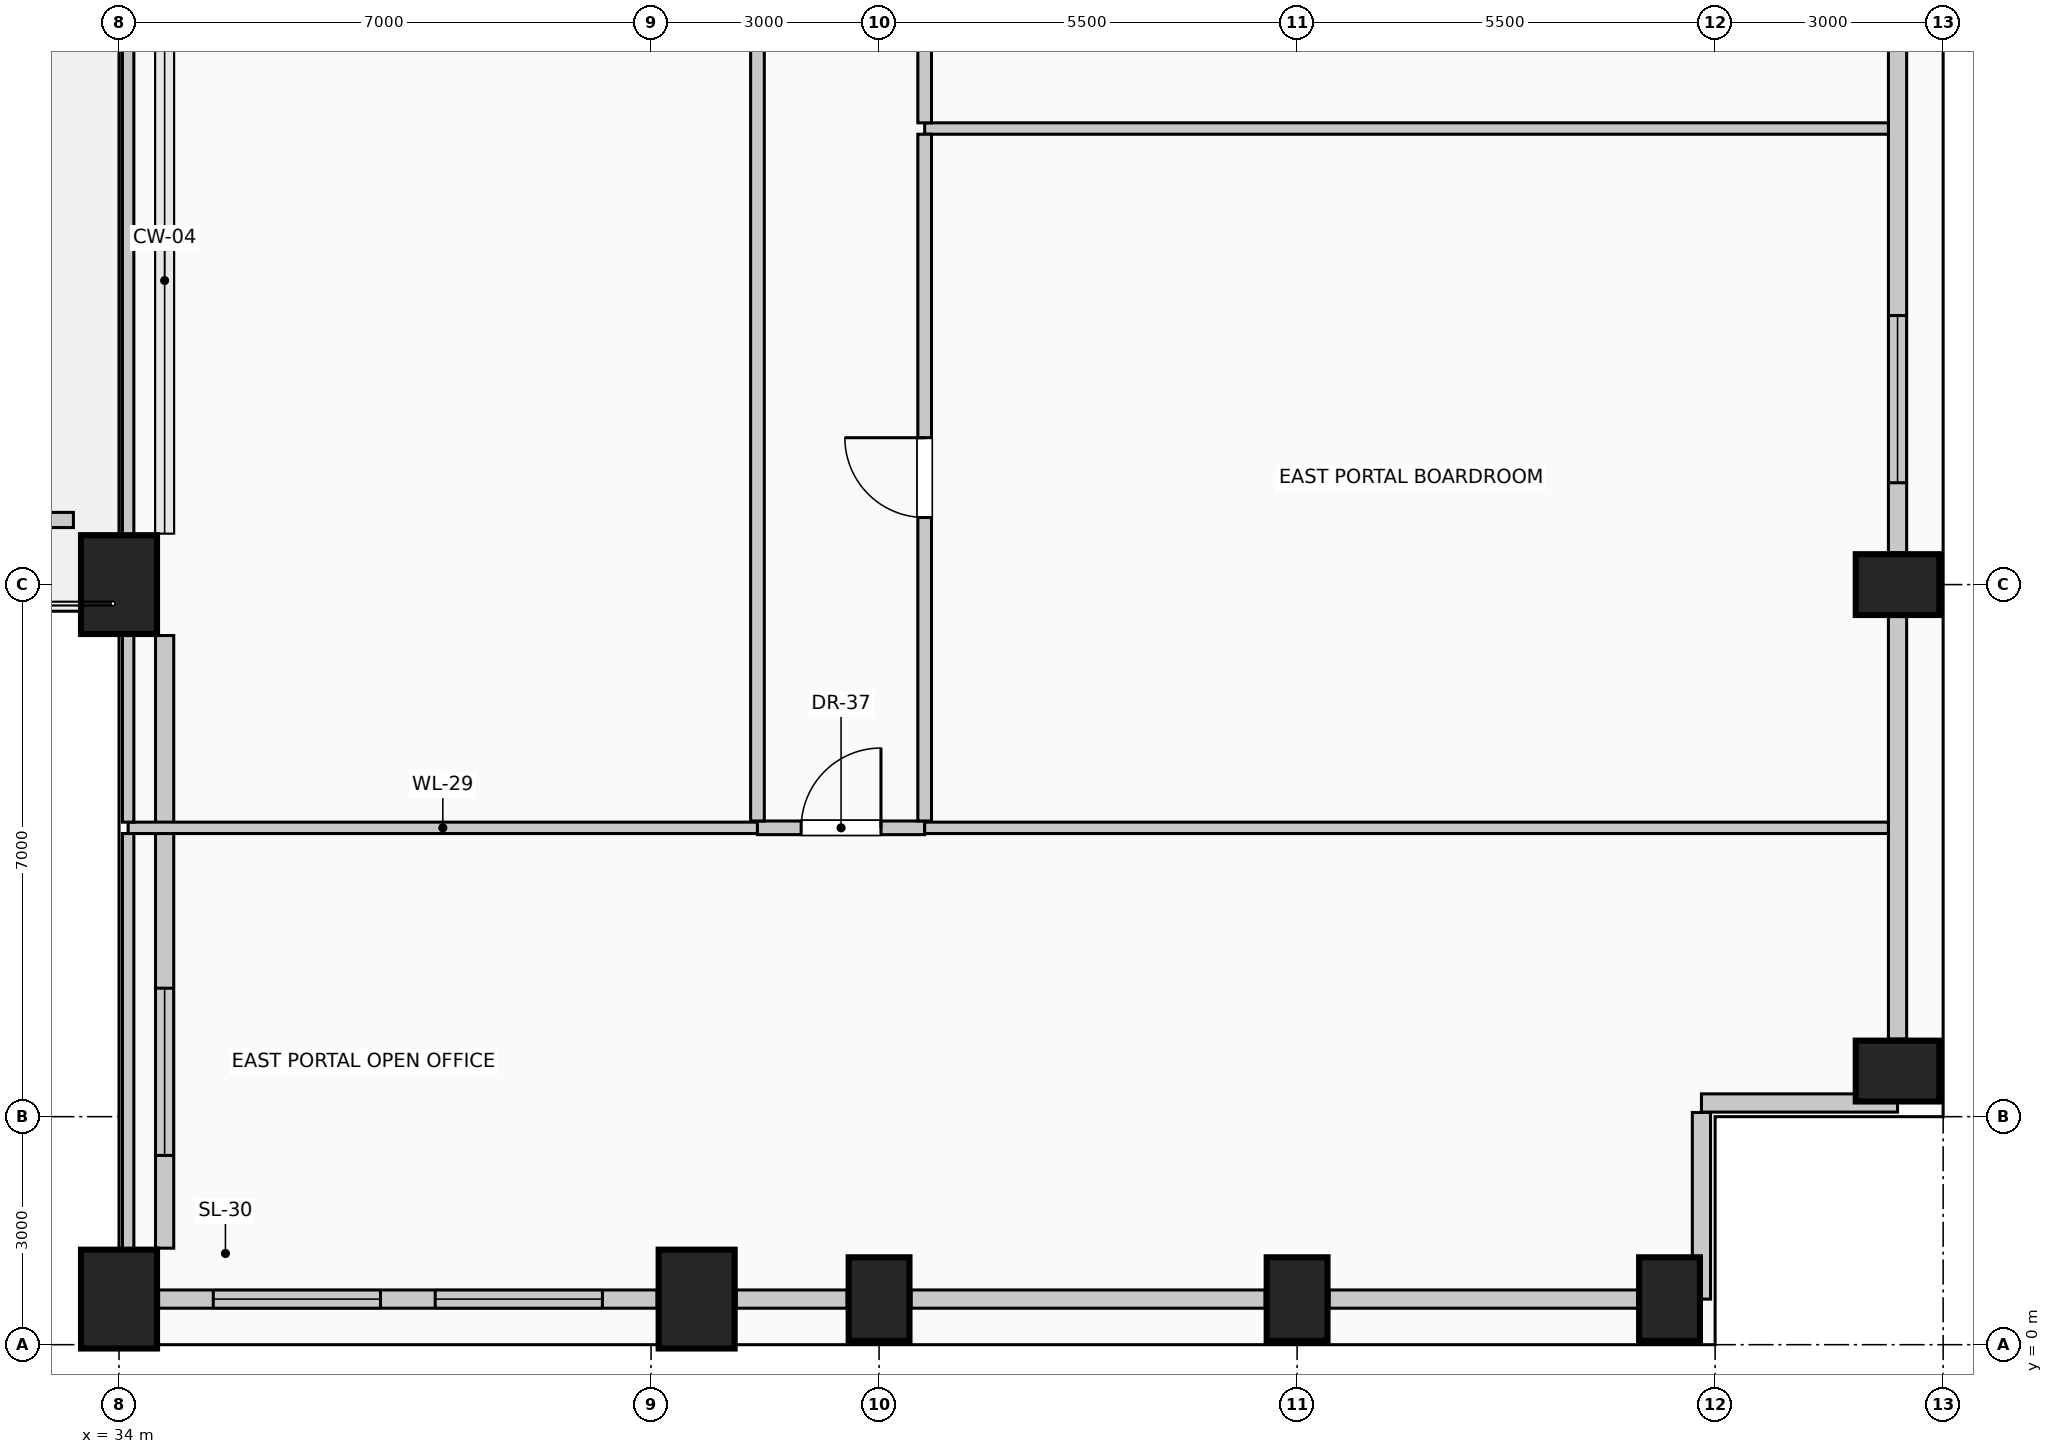
"""IFC4 building model, lengths in metres.
Left out: names, types, materials, properties, quantities, classifications, styles, units other than length and angle.
Written with IfcOpenShell. Run it as: python <this file> out.ifc"""

import sys

from ifc_helpers import new_model, si_unit, direction, frame, frame_2d, origin, origin_2d, place, context, subcontext, project, spatial, rectangle, extrude, element, fill, save


model = new_model("IFC4")
c1 = context("Model", 3, precision=1e-05, world=origin(), true_north=direction((0.0, 1.0)))
c2 = subcontext(c1, "Body", "Model", "MODEL_VIEW")
j1 = project(units=[si_unit("LENGTHUNIT", "METRE"), si_unit("PLANEANGLEUNIT", "RADIAN")], contexts=[c1])
p1 = place(None, origin())
s1 = spatial("IfcSite", under=j1, at=p1, CompositionType="ELEMENT")
p2 = place(p1, origin())
s2 = spatial("IfcBuilding", under=s1, at=p2, CompositionType="ELEMENT")
p3 = place(p2, frame((0.0, 0.0, 182.6)))
s3 = spatial("IfcBuildingStorey", under=s2, at=p3, CompositionType="ELEMENT", Elevation=182.6)
for number, where, z_axis, x_axis in (
    (1, (34.0, 0.6, 0.0), (0.0, 0.0, 1.0), (1.0, 0.0, 0.0)),
    (2, (41.6, 0.6, 0.0), (0.0, 0.0, 1.0), (1.0, 0.0, 0.0)),
):
    element("IfcColumn", number, at=place(p3, frame(where, z_axis=z_axis, x_axis=x_axis)), inside=s3, PredefinedType="COLUMN", context=c2, shape_type="SweptSolid", body=[
        extrude(rectangle(XDim=1.0, YDim=1.3, at=origin_2d()), origin(), (0.0, 0.0, 1.0), 4.0),
    ])
for number, where, z_axis, x_axis in (
    (3, (44.0, 0.6, 0.0), (0.0, 0.0, 1.0), (1.0, 0.0, 0.0)),
    (4, (49.5, 0.6, 0.0), (0.0, 0.0, 1.0), (1.0, 0.0, 0.0)),
    (5, (54.4, 0.6, 0.0), (0.0, 0.0, 1.0), (1.0, 0.0, 0.0)),
    (6, (57.4, 3.6, 0.0), (0.0, 0.0, 1.0), (0.0, 1.0, 0.0)),
    (7, (57.4, 10.0, 0.0), (0.0, 0.0, 1.0), (0.0, 1.0, 0.0)),
):
    element("IfcColumn", number, at=place(p3, frame(where, z_axis=z_axis, x_axis=x_axis)), inside=s3, PredefinedType="COLUMN", context=c2, shape_type="SweptSolid", body=[
        extrude(rectangle(XDim=0.8, YDim=1.1, at=origin_2d()), origin(), (0.0, 0.0, 1.0), 4.0),
    ])
p4 = place(p3, frame((34.0, 10.0, 0.0), z_axis=(0.0, 0.0, 1.0), x_axis=(1.0, 0.0, 0.0)))
e8 = element("IfcColumn", 8, at=p4, inside=s3, PredefinedType="COLUMN", context=c2, shape_type="SweptSolid", body=[
    extrude(rectangle(XDim=1.0, YDim=1.3, at=origin_2d()), origin(), (0.0, 0.0, 1.0), 4.0),
])
p5 = place(p3, frame((41.08, 0.6, 0.0), z_axis=(0.0, 0.0, 1.0), x_axis=(-1.0, 0.0, 0.0)))
e9 = element("IfcWall", 9, at=p5, inside=s3, PredefinedType="SOLIDWALL", context=c2, shape_type="SweptSolid", body=[
    extrude(rectangle(XDim=6.56, YDim=0.24, at=frame_2d((3.28, 0.0))), origin(), (0.0, 0.0, 1.0), 3.0),
])
p6 = place(p5, frame((0.72, 0.0, 0.42)))
e10 = element("IfcOpeningElement", 10, at=p6, cuts=e9, PredefinedType="OPENING", context=c2, shape_type="SweptSolid", body=[
    extrude(rectangle(XDim=2.2, YDim=1.95, at=frame_2d((1.1, 0.975))), frame((0.0, 0.13, 0.0), z_axis=(0.0, -1.0, 0.0), x_axis=(1.0, 0.0, 0.0)), (0.0, 0.0, 1.0), 0.26),
])
p7 = place(p5, frame((3.64, 0.0, 0.42)))
e11 = element("IfcOpeningElement", 11, at=p7, cuts=e9, PredefinedType="OPENING", context=c2, shape_type="SweptSolid", body=[
    extrude(rectangle(XDim=2.2, YDim=1.95, at=frame_2d((1.1, 0.975))), frame((0.0, 0.13, 0.0), z_axis=(0.0, -1.0, 0.0), x_axis=(1.0, 0.0, 0.0)), (0.0, 0.0, 1.0), 0.26),
])
p8 = place(p3, frame((43.58, 0.6, 0.0), z_axis=(0.0, 0.0, 1.0), x_axis=(-1.0, 0.0, 0.0)))
e12 = element("IfcWall", 12, at=p8, inside=s3, PredefinedType="SOLIDWALL", context=c2, shape_type="SweptSolid", body=[
    extrude(rectangle(XDim=1.46, YDim=0.24, at=frame_2d((0.73, 0.0))), origin(), (0.0, 0.0, 1.0), 3.0),
])
p9 = place(p3, frame((49.08, 0.6, 0.0), z_axis=(0.0, 0.0, 1.0), x_axis=(-1.0, 0.0, 0.0)))
e13 = element("IfcWall", 13, at=p9, inside=s3, PredefinedType="SOLIDWALL", context=c2, shape_type="SweptSolid", body=[
    extrude(rectangle(XDim=4.66, YDim=0.24, at=frame_2d((2.33, 0.0))), origin(), (0.0, 0.0, 1.0), 3.0),
])
p10 = place(p3, frame((53.98, 0.6, 0.0), z_axis=(0.0, 0.0, 1.0), x_axis=(-1.0, 0.0, 0.0)))
e14 = element("IfcWall", 14, at=p10, inside=s3, PredefinedType="SOLIDWALL", context=c2, shape_type="SweptSolid", body=[
    extrude(rectangle(XDim=4.06, YDim=0.24, at=frame_2d((2.03, 0.0))), origin(), (0.0, 0.0, 1.0), 3.0),
])
p11 = place(p3, frame((57.4, 9.58, 0.0), z_axis=(0.0, 0.0, 1.0), x_axis=(0.0, -1.0, 0.0)))
e15 = element("IfcWall", 15, at=p11, inside=s3, PredefinedType="SOLIDWALL", context=c2, shape_type="SweptSolid", body=[
    extrude(rectangle(XDim=5.56, YDim=0.24, at=frame_2d((2.78, 0.0))), origin(), (0.0, 0.0, 1.0), 3.0),
])
p12 = place(p3, frame((57.4, 17.58, 0.0), z_axis=(0.0, 0.0, 1.0), x_axis=(0.0, -1.0, 0.0)))
e16 = element("IfcWall", 16, at=p12, inside=s3, PredefinedType="SOLIDWALL", context=c2, shape_type="SweptSolid", body=[
    extrude(rectangle(XDim=7.16, YDim=0.24, at=frame_2d((3.58, 0.0))), origin(), (0.0, 0.0, 1.0), 3.0),
])
p13 = place(p12, frame((4.04, 0.0, 0.42)))
e17 = element("IfcOpeningElement", 17, at=p13, cuts=e16, PredefinedType="OPENING", context=c2, shape_type="SweptSolid", body=[
    extrude(rectangle(XDim=2.2, YDim=1.95, at=frame_2d((1.1, 0.975))), frame((0.0, 0.13, 0.0), z_axis=(0.0, -1.0, 0.0), x_axis=(1.0, 0.0, 0.0)), (0.0, 0.0, 1.0), 0.26),
])
p14 = place(p3, frame((57.4, 3.18, 0.0), z_axis=(0.0, 0.0, 1.0), x_axis=(-1.0, 0.0, 0.0)))
e18 = element("IfcWall", 18, at=p14, inside=s3, PredefinedType="SOLIDWALL", context=c2, shape_type="SweptSolid", body=[
    extrude(rectangle(XDim=2.58, YDim=0.24, at=frame_2d((1.29, 0.0))), origin(), (0.0, 0.0, 1.0), 3.75),
])
p15 = place(p3, frame((54.82, 3.055, 0.0), z_axis=(0.0, 0.0, 1.0), x_axis=(0.0, -1.0, 0.0)))
e19 = element("IfcWall", 19, at=p15, inside=s3, PredefinedType="SOLIDWALL", context=c2, shape_type="SweptSolid", body=[
    extrude(rectangle(XDim=2.455, YDim=0.24, at=frame_2d((1.228, 0.0))), origin(), (0.0, 0.0, 1.0), 3.75),
])
p16 = place(p3, frame((34.6, 1.27, 0.0), z_axis=(0.0, 0.0, 1.0), x_axis=(0.0, 1.0, 0.0)))
e20 = element("IfcWall", 20, at=p16, inside=s3, PredefinedType="SOLIDWALL", context=c2, shape_type="SweptSolid", body=[
    extrude(rectangle(XDim=8.06, YDim=0.24, at=frame_2d((4.03, 0.0))), origin(), (0.0, 0.0, 1.0), 3.75),
])
p17 = place(p16, frame((1.22, 0.0, 0.42)))
e21 = element("IfcOpeningElement", 21, at=p17, cuts=e20, PredefinedType="OPENING", context=c2, shape_type="SweptSolid", body=[
    extrude(rectangle(XDim=2.2, YDim=1.95, at=frame_2d((1.1, 0.975))), frame((0.0, 0.13, 0.0), z_axis=(0.0, -1.0, 0.0), x_axis=(1.0, 0.0, 0.0)), (0.0, 0.0, 1.0), 0.26),
])
p18 = place(p3, frame((24.6, 10.85, 0.0), z_axis=(0.0, 0.0, 1.0), x_axis=(1.0, 0.0, 0.0)))
e22 = element("IfcWall", 22, at=p18, inside=s3, PredefinedType="USERDEFINED", context=c2, shape_type="SweptSolid", body=[
    extrude(rectangle(XDim=8.8, YDim=0.2, at=frame_2d((4.4, 0.0))), origin(), (0.0, 0.0, 1.0), 0.55),
])
p19 = place(p3, frame((34.12, 6.8, 0.0), z_axis=(0.0, 0.0, 1.0), x_axis=(1.0, 0.0, 0.0)))
e23 = element("IfcWall", 23, at=p19, inside=s3, PredefinedType="PARTITIONING", context=c2, shape_type="SweptSolid", body=[
    extrude(rectangle(XDim=8.28, YDim=0.15, at=frame_2d((4.14, 0.0))), origin(), (0.0, 0.0, 1.0), 3.245),
])
p20 = place(p3, frame((42.4, 6.8, 0.0), z_axis=(0.0, 0.0, 1.0), x_axis=(1.0, 0.0, 0.0)))
e24 = element("IfcWall", 24, at=p20, inside=s3, PredefinedType="PARTITIONING", context=c2, shape_type="SweptSolid", body=[
    extrude(rectangle(XDim=2.2, YDim=0.18, at=frame_2d((1.1, 0.0))), origin(), (0.0, 0.0, 1.0), 3.245),
])
p21 = place(p20, frame((0.575, 0.0, 0.0)))
e25 = element("IfcOpeningElement", 25, at=p21, cuts=e24, PredefinedType="OPENING", context=c2, shape_type="SweptSolid", body=[
    extrude(rectangle(XDim=1.05, YDim=2.15, at=frame_2d((0.525, 1.075))), frame((0.0, 0.1, 0.0), z_axis=(0.0, -1.0, 0.0), x_axis=(1.0, 0.0, 0.0)), (0.0, 0.0, 1.0), 0.2),
])
p22 = place(p3, frame((44.6, 6.8, 0.0), z_axis=(0.0, 0.0, 1.0), x_axis=(1.0, 0.0, 0.0)))
e26 = element("IfcWall", 26, at=p22, inside=s3, PredefinedType="PARTITIONING", context=c2, shape_type="SweptSolid", body=[
    extrude(rectangle(XDim=12.68, YDim=0.15, at=frame_2d((6.34, 0.0))), origin(), (0.0, 0.0, 1.0), 3.245),
])
p23 = place(p3, frame((44.6, 16.0, 0.0), z_axis=(0.0, 0.0, 1.0), x_axis=(1.0, 0.0, 0.0)))
e27 = element("IfcWall", 27, at=p23, inside=s3, PredefinedType="PARTITIONING", context=c2, shape_type="SweptSolid", body=[
    extrude(rectangle(XDim=12.68, YDim=0.15, at=frame_2d((6.34, 0.0))), origin(), (0.0, 0.0, 1.0), 3.75),
])
p24 = place(p3, frame((34.12, 1.25, 0.0), z_axis=(0.0, 0.0, 1.0), x_axis=(0.0, 1.0, 0.0)))
e28 = element("IfcWall", 28, at=p24, inside=s3, PredefinedType="PARTITIONING", context=c2, shape_type="SweptSolid", body=[
    extrude(rectangle(XDim=5.475, YDim=0.15, at=frame_2d((2.738, 0.0))), origin(), (0.0, 0.0, 1.0), 3.145),
])
p25 = place(p3, frame((34.12, 6.875, 0.0), z_axis=(0.0, 0.0, 1.0), x_axis=(0.0, 1.0, 0.0)))
e29 = element("IfcWall", 29, at=p25, inside=s3, PredefinedType="PARTITIONING", context=c2, shape_type="SweptSolid", body=[
    extrude(rectangle(XDim=2.475, YDim=0.15, at=frame_2d((1.238, 0.0))), origin(), (0.0, 0.0, 1.0), 3.145),
])
p26 = place(p3, frame((34.12, 10.65, 0.0), z_axis=(0.0, 0.0, 1.0), x_axis=(0.0, 1.0, 0.0)))
e30 = element("IfcWall", 30, at=p26, inside=s3, PredefinedType="PARTITIONING", context=c2, shape_type="SweptSolid", body=[
    extrude(rectangle(XDim=6.7, YDim=0.15, at=frame_2d((3.35, 0.0))), origin(), (0.0, 0.0, 1.0), 3.145),
])
p27 = place(p3, frame((42.4, 6.89, 0.0), z_axis=(0.0, 0.0, 1.0), x_axis=(0.0, 1.0, 0.0)))
e31 = element("IfcWall", 31, at=p27, inside=s3, PredefinedType="PARTITIONING", context=c2, shape_type="SweptSolid", body=[
    extrude(rectangle(XDim=25.385, YDim=0.18, at=frame_2d((12.692, 0.0))), origin(), (0.0, 0.0, 1.0), 3.75),
])
p28 = place(p27, frame((12.938, 0.0, 0.0)))
e32 = element("IfcOpeningElement", 32, at=p28, cuts=e31, PredefinedType="OPENING", context=c2, shape_type="SweptSolid", body=[
    extrude(rectangle(XDim=0.95, YDim=2.15, at=frame_2d((0.475, 1.075))), frame((0.0, 0.1, 0.0), z_axis=(0.0, -1.0, 0.0), x_axis=(1.0, 0.0, 0.0)), (0.0, 0.0, 1.0), 0.2),
])
p29 = place(p3, frame((44.6, 6.89, 0.0), z_axis=(0.0, 0.0, 1.0), x_axis=(0.0, 1.0, 0.0)))
e33 = element("IfcWall", 33, at=p29, inside=s3, PredefinedType="PARTITIONING", context=c2, shape_type="SweptSolid", body=[
    extrude(rectangle(XDim=9.035, YDim=0.18, at=frame_2d((4.518, 0.0))), origin(), (0.0, 0.0, 1.0), 3.75),
])
p30 = place(p29, frame((3.992, 0.0, 0.0)))
e34 = element("IfcOpeningElement", 34, at=p30, cuts=e33, PredefinedType="OPENING", context=c2, shape_type="SweptSolid", body=[
    extrude(rectangle(XDim=1.05, YDim=2.15, at=frame_2d((0.525, 1.075))), frame((0.0, 0.1, 0.0), z_axis=(0.0, -1.0, 0.0), x_axis=(1.0, 0.0, 0.0)), (0.0, 0.0, 1.0), 0.2),
])
p31 = place(p3, frame((44.6, 16.075, 0.0), z_axis=(0.0, 0.0, 1.0), x_axis=(0.0, 1.0, 0.0)))
e35 = element("IfcWall", 35, at=p31, inside=s3, PredefinedType="PARTITIONING", context=c2, shape_type="SweptSolid", body=[
    extrude(rectangle(XDim=5.25, YDim=0.18, at=frame_2d((2.625, 0.0))), origin(), (0.0, 0.0, 1.0), 3.75),
])
p32 = place(p31, frame((2.15, 0.0, 0.0)))
e36 = element("IfcOpeningElement", 36, at=p32, cuts=e35, PredefinedType="OPENING", context=c2, shape_type="SweptSolid", body=[
    extrude(rectangle(XDim=0.95, YDim=2.15, at=frame_2d((0.475, 1.075))), frame((0.0, 0.1, 0.0), z_axis=(0.0, -1.0, 0.0), x_axis=(1.0, 0.0, 0.0)), (0.0, 0.0, 1.0), 0.2),
])
p33 = place(p6, origin())
e37 = element("IfcWindow", 37, at=p33, inside=s3, PartitioningType="SINGLE_PANEL", PredefinedType="WINDOW", context=c2, shape_type="SweptSolid", body=[
    extrude(rectangle(XDim=2.2, YDim=1.95, at=frame_2d((1.1, 0.975))), frame((0.0, 0.03, 0.0), z_axis=(0.0, -1.0, 0.0), x_axis=(1.0, 0.0, 0.0)), (0.0, 0.0, 1.0), 0.06),
])
fill(e10, e37)
p34 = place(p7, origin())
e38 = element("IfcWindow", 38, at=p34, inside=s3, PartitioningType="SINGLE_PANEL", PredefinedType="WINDOW", context=c2, shape_type="SweptSolid", body=[
    extrude(rectangle(XDim=2.2, YDim=1.95, at=frame_2d((1.1, 0.975))), frame((0.0, 0.03, 0.0), z_axis=(0.0, -1.0, 0.0), x_axis=(1.0, 0.0, 0.0)), (0.0, 0.0, 1.0), 0.06),
])
fill(e11, e38)
p35 = place(p13, origin())
e39 = element("IfcWindow", 39, at=p35, inside=s3, PartitioningType="SINGLE_PANEL", PredefinedType="WINDOW", context=c2, shape_type="SweptSolid", body=[
    extrude(rectangle(XDim=2.2, YDim=1.95, at=frame_2d((1.1, 0.975))), frame((0.0, 0.03, 0.0), z_axis=(0.0, -1.0, 0.0), x_axis=(1.0, 0.0, 0.0)), (0.0, 0.0, 1.0), 0.06),
])
fill(e17, e39)
p36 = place(p17, origin())
e40 = element("IfcWindow", 40, at=p36, inside=s3, PartitioningType="SINGLE_PANEL", PredefinedType="WINDOW", context=c2, shape_type="SweptSolid", body=[
    extrude(rectangle(XDim=2.2, YDim=1.95, at=frame_2d((1.1, 0.975))), frame((0.0, 0.03, 0.0), z_axis=(0.0, -1.0, 0.0), x_axis=(1.0, 0.0, 0.0)), (0.0, 0.0, 1.0), 0.06),
])
fill(e21, e40)
p37 = place(p21, origin())
e41 = element("IfcDoor", 41, at=p37, inside=s3, OperationType="SINGLE_SWING_RIGHT", PredefinedType="DOOR", context=c2, shape_type="SweptSolid", body=[
    extrude(rectangle(XDim=1.05, YDim=2.15, at=frame_2d((0.525, 1.075))), frame((0.0, 0.025, 0.0), z_axis=(0.0, -1.0, 0.0), x_axis=(1.0, 0.0, 0.0)), (0.0, 0.0, 1.0), 0.05),
])
fill(e25, e41)
p38 = place(p30, origin())
e42 = element("IfcDoor", 42, at=p38, inside=s3, OperationType="SINGLE_SWING_RIGHT", PredefinedType="DOOR", context=c2, shape_type="SweptSolid", body=[
    extrude(rectangle(XDim=1.05, YDim=2.15, at=frame_2d((0.525, 1.075))), frame((0.0, 0.025, 0.0), z_axis=(0.0, -1.0, 0.0), x_axis=(1.0, 0.0, 0.0)), (0.0, 0.0, 1.0), 0.05),
])
fill(e34, e42)
save(model, sys.argv[1])
